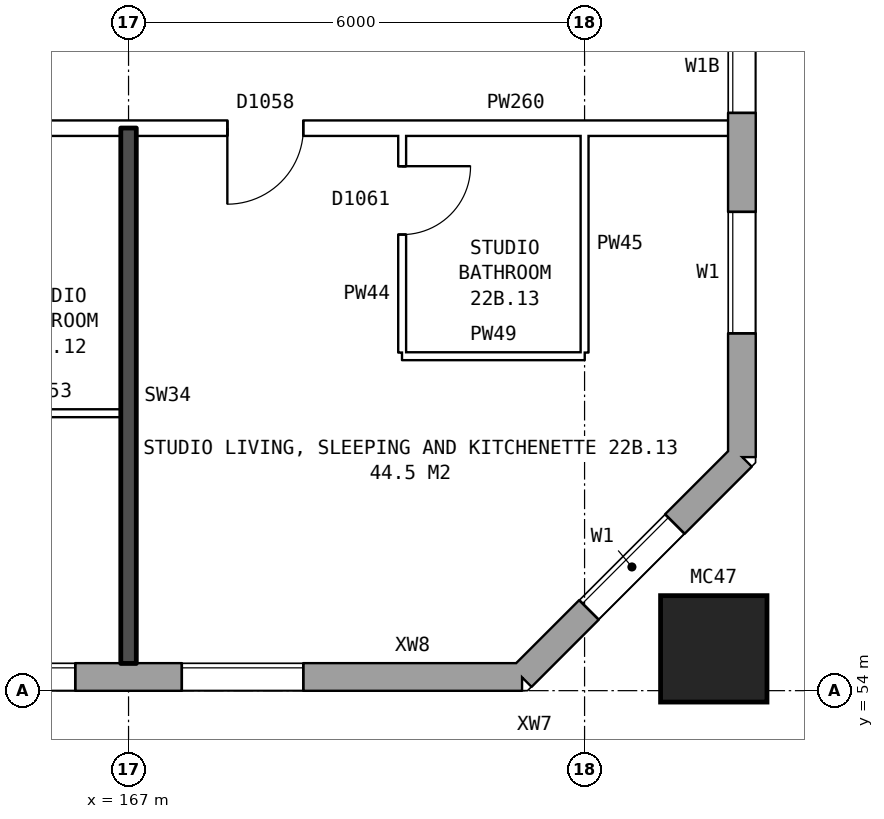
"""IFC4 building model, lengths in metres.
Left out: names, types, materials, properties, quantities, classifications, styles, units other than length and angle.
Written with IfcOpenShell. Run it as: python <this file> out.ifc"""

import sys

from ifc_helpers import new_model, si_unit, direction, frame, frame_2d, origin, origin_2d, place, context, subcontext, project, spatial, rectangle, hollow_rectangle, extrude, element, fill, save


model = new_model("IFC4")
c1 = context("Model", 3, precision=1e-05, world=origin(), true_north=direction((0.0, 1.0)))
c2 = subcontext(c1, "Body", "Model", "MODEL_VIEW")
j1 = project(units=[si_unit("LENGTHUNIT", "METRE"), si_unit("PLANEANGLEUNIT", "RADIAN")], contexts=[c1])
p1 = place(None, origin())
s1 = spatial("IfcSite", under=j1, at=p1, CompositionType="ELEMENT")
p2 = place(p1, origin())
s2 = spatial("IfcBuilding", under=s1, at=p2, CompositionType="ELEMENT")
p3 = place(p2, frame((0.0, 0.0, 80.9)))
s3 = spatial("IfcBuildingStorey", under=s2, at=p3, CompositionType="ELEMENT", Elevation=80.9)
p4 = place(p3, frame((174.7, 54.55, 0.0), z_axis=(0.0, 0.0, 1.0), x_axis=(1.0, 0.0, 0.0)))
e1 = element("IfcColumn", 1, at=p4, inside=s3, PredefinedType="COLUMN", context=c2, shape_type="SweptSolid", body=[
    extrude(hollow_rectangle(XDim=1.4, YDim=1.4, WallThickness=0.075, at=origin_2d()), origin(), (0.0, 0.0, 1.0), 3.1),
])
p5 = place(p3, frame((134.075, 54.18, 0.0), z_axis=(0.0, 0.0, 1.0), x_axis=(1.0, 0.0, 0.0)))
e2 = element("IfcWall", 2, at=p5, inside=s3, PredefinedType="STANDARD", context=c2, shape_type="SweptSolid", body=[
    extrude(rectangle(XDim=38.101, YDim=0.36, at=frame_2d((19.05, 0.0))), origin(), (0.0, 0.0, 1.0), 2.85),
])
p6 = place(p5, frame((0.625, 0.0, 0.8)))
e3 = element("IfcOpeningElement", 3, at=p6, cuts=e2, PredefinedType="OPENING", context=c2, shape_type="SweptSolid", body=[
    extrude(rectangle(XDim=1.6, YDim=1.8, at=frame_2d((0.8, 0.9))), frame((0.0, 0.19, 0.0), z_axis=(0.0, -1.0, 0.0), x_axis=(1.0, 0.0, 0.0)), (0.0, 0.0, 1.0), 0.38),
])
p7 = place(p5, frame((3.625, 0.0, 0.8)))
e4 = element("IfcOpeningElement", 4, at=p7, cuts=e2, PredefinedType="OPENING", context=c2, shape_type="SweptSolid", body=[
    extrude(rectangle(XDim=1.6, YDim=1.8, at=frame_2d((0.8, 0.9))), frame((0.0, 0.19, 0.0), z_axis=(0.0, -1.0, 0.0), x_axis=(1.0, 0.0, 0.0)), (0.0, 0.0, 1.0), 0.38),
])
p8 = place(p5, frame((6.625, 0.0, 0.8)))
e5 = element("IfcOpeningElement", 5, at=p8, cuts=e2, PredefinedType="OPENING", context=c2, shape_type="SweptSolid", body=[
    extrude(rectangle(XDim=1.6, YDim=1.8, at=frame_2d((0.8, 0.9))), frame((0.0, 0.19, 0.0), z_axis=(0.0, -1.0, 0.0), x_axis=(1.0, 0.0, 0.0)), (0.0, 0.0, 1.0), 0.38),
])
p9 = place(p5, frame((9.125, 0.0, 0.8)))
e6 = element("IfcOpeningElement", 6, at=p9, cuts=e2, PredefinedType="OPENING", context=c2, shape_type="SweptSolid", body=[
    extrude(rectangle(XDim=1.4, YDim=1.8, at=frame_2d((0.7, 0.9))), frame((0.0, 0.19, 0.0), z_axis=(0.0, -1.0, 0.0), x_axis=(1.0, 0.0, 0.0)), (0.0, 0.0, 1.0), 0.38),
])
p10 = place(p5, frame((12.575, 0.0, 0.8)))
e7 = element("IfcOpeningElement", 7, at=p10, cuts=e2, PredefinedType="OPENING", context=c2, shape_type="SweptSolid", body=[
    extrude(rectangle(XDim=0.6, YDim=0.9, at=frame_2d((0.3, 0.45))), frame((0.0, 0.19, 0.0), z_axis=(0.0, -1.0, 0.0), x_axis=(1.0, 0.0, 0.0)), (0.0, 0.0, 1.0), 0.38),
])
p11 = place(p5, frame((15.625, 0.0, 0.8)))
e8 = element("IfcOpeningElement", 8, at=p11, cuts=e2, PredefinedType="OPENING", context=c2, shape_type="SweptSolid", body=[
    extrude(rectangle(XDim=1.6, YDim=1.8, at=frame_2d((0.8, 0.9))), frame((0.0, 0.19, 0.0), z_axis=(0.0, -1.0, 0.0), x_axis=(1.0, 0.0, 0.0)), (0.0, 0.0, 1.0), 0.38),
])
p12 = place(p5, frame((18.625, 0.0, 0.8)))
e9 = element("IfcOpeningElement", 9, at=p12, cuts=e2, PredefinedType="OPENING", context=c2, shape_type="SweptSolid", body=[
    extrude(rectangle(XDim=1.6, YDim=1.8, at=frame_2d((0.8, 0.9))), frame((0.0, 0.19, 0.0), z_axis=(0.0, -1.0, 0.0), x_axis=(1.0, 0.0, 0.0)), (0.0, 0.0, 1.0), 0.38),
])
p13 = place(p5, frame((21.625, 0.0, 0.8)))
e10 = element("IfcOpeningElement", 10, at=p13, cuts=e2, PredefinedType="OPENING", context=c2, shape_type="SweptSolid", body=[
    extrude(rectangle(XDim=1.6, YDim=1.8, at=frame_2d((0.8, 0.9))), frame((0.0, 0.19, 0.0), z_axis=(0.0, -1.0, 0.0), x_axis=(1.0, 0.0, 0.0)), (0.0, 0.0, 1.0), 0.38),
])
p14 = place(p5, frame((23.525, 0.0, 0.8)))
e11 = element("IfcOpeningElement", 11, at=p14, cuts=e2, PredefinedType="OPENING", context=c2, shape_type="SweptSolid", body=[
    extrude(rectangle(XDim=1.0, YDim=1.8, at=frame_2d((0.5, 0.9))), frame((0.0, 0.19, 0.0), z_axis=(0.0, -1.0, 0.0), x_axis=(1.0, 0.0, 0.0)), (0.0, 0.0, 1.0), 0.38),
])
p15 = place(p5, frame((27.625, 0.0, 0.8)))
e12 = element("IfcOpeningElement", 12, at=p15, cuts=e2, PredefinedType="OPENING", context=c2, shape_type="SweptSolid", body=[
    extrude(rectangle(XDim=1.6, YDim=1.8, at=frame_2d((0.8, 0.9))), frame((0.0, 0.19, 0.0), z_axis=(0.0, -1.0, 0.0), x_axis=(1.0, 0.0, 0.0)), (0.0, 0.0, 1.0), 0.38),
])
p16 = place(p5, frame((30.625, 0.0, 0.8)))
e13 = element("IfcOpeningElement", 13, at=p16, cuts=e2, PredefinedType="OPENING", context=c2, shape_type="SweptSolid", body=[
    extrude(rectangle(XDim=1.6, YDim=1.8, at=frame_2d((0.8, 0.9))), frame((0.0, 0.19, 0.0), z_axis=(0.0, -1.0, 0.0), x_axis=(1.0, 0.0, 0.0)), (0.0, 0.0, 1.0), 0.38),
])
p17 = place(p5, frame((33.625, 0.0, 0.8)))
e14 = element("IfcOpeningElement", 14, at=p17, cuts=e2, PredefinedType="OPENING", context=c2, shape_type="SweptSolid", body=[
    extrude(rectangle(XDim=1.6, YDim=1.8, at=frame_2d((0.8, 0.9))), frame((0.0, 0.19, 0.0), z_axis=(0.0, -1.0, 0.0), x_axis=(1.0, 0.0, 0.0)), (0.0, 0.0, 1.0), 0.38),
])
p18 = place(p5, frame((10.825, 0.0, 1.7)))
e15 = element("IfcOpeningElement", 15, at=p18, cuts=e2, PredefinedType="OPENING", context=c2, shape_type="SweptSolid", body=[
    extrude(rectangle(XDim=0.6, YDim=0.9, at=frame_2d((0.3, 0.45))), frame((0.0, 0.19, 0.0), z_axis=(0.0, -1.0, 0.0), x_axis=(1.0, 0.0, 0.0)), (0.0, 0.0, 1.0), 0.38),
])
p19 = place(p5, frame((13.475, 0.0, 0.8)))
e16 = element("IfcOpeningElement", 16, at=p19, cuts=e2, PredefinedType="OPENING", context=c2, shape_type="SweptSolid", body=[
    extrude(rectangle(XDim=1.2, YDim=1.8, at=frame_2d((0.6, 0.9))), frame((0.0, 0.19, 0.0), z_axis=(0.0, -1.0, 0.0), x_axis=(1.0, 0.0, 0.0)), (0.0, 0.0, 1.0), 0.38),
])
p20 = place(p5, frame((24.825, 0.0, 0.8)))
e17 = element("IfcOpeningElement", 17, at=p20, cuts=e2, PredefinedType="OPENING", context=c2, shape_type="SweptSolid", body=[
    extrude(rectangle(XDim=0.6, YDim=0.9, at=frame_2d((0.3, 0.45))), frame((0.0, 0.19, 0.0), z_axis=(0.0, -1.0, 0.0), x_axis=(1.0, 0.0, 0.0)), (0.0, 0.0, 1.0), 0.38),
])
p21 = place(p3, frame((172.175, 54.18, 0.0), z_axis=(0.0, 0.0, 1.0), x_axis=(0.707106781187, 0.707106781187, 0.0)))
e18 = element("IfcWall", 18, at=p21, inside=s3, PredefinedType="STANDARD", context=c2, shape_type="SweptSolid", body=[
    extrude(rectangle(XDim=4.094, YDim=0.36, at=frame_2d((2.047, 0.0))), origin(), (0.0, 0.0, 1.0), 2.85),
])
p22 = place(p21, frame((1.247, 0.0, 0.8)))
e19 = element("IfcOpeningElement", 19, at=p22, cuts=e18, PredefinedType="OPENING", context=c2, shape_type="SweptSolid", body=[
    extrude(rectangle(XDim=1.6, YDim=1.8, at=frame_2d((0.8, 0.9))), frame((0.0, 0.19, 0.0), z_axis=(0.0, -1.0, 0.0), x_axis=(1.0, 0.0, 0.0)), (0.0, 0.0, 1.0), 0.38),
])
p23 = place(p3, frame((175.07, 57.075, 0.0), z_axis=(0.0, 0.0, 1.0), x_axis=(0.0, 1.0, 0.0)))
e20 = element("IfcWall", 20, at=p23, inside=s3, PredefinedType="STANDARD", context=c2, shape_type="SweptSolid", body=[
    extrude(rectangle(XDim=25.851, YDim=0.36, at=frame_2d((12.925, 0.0))), origin(), (0.0, 0.0, 1.0), 2.85),
])
p24 = place(p23, frame((1.625, 0.0, 0.8)))
e21 = element("IfcOpeningElement", 21, at=p24, cuts=e20, PredefinedType="OPENING", context=c2, shape_type="SweptSolid", body=[
    extrude(rectangle(XDim=1.6, YDim=1.8, at=frame_2d((0.8, 0.9))), frame((0.0, 0.19, 0.0), z_axis=(0.0, -1.0, 0.0), x_axis=(1.0, 0.0, 0.0)), (0.0, 0.0, 1.0), 0.38),
])
p25 = place(p23, frame((4.525, 0.0, 0.8)))
e22 = element("IfcOpeningElement", 22, at=p25, cuts=e20, PredefinedType="OPENING", context=c2, shape_type="SweptSolid", body=[
    extrude(rectangle(XDim=1.2, YDim=1.8, at=frame_2d((0.6, 0.9))), frame((0.0, 0.19, 0.0), z_axis=(0.0, -1.0, 0.0), x_axis=(1.0, 0.0, 0.0)), (0.0, 0.0, 1.0), 0.38),
])
p26 = place(p23, frame((6.025, 0.0, 0.8)))
e23 = element("IfcOpeningElement", 23, at=p26, cuts=e20, PredefinedType="OPENING", context=c2, shape_type="SweptSolid", body=[
    extrude(rectangle(XDim=1.0, YDim=0.9, at=frame_2d((0.5, 0.45))), frame((0.0, 0.19, 0.0), z_axis=(0.0, -1.0, 0.0), x_axis=(1.0, 0.0, 0.0)), (0.0, 0.0, 1.0), 0.38),
])
p27 = place(p23, frame((10.625, 0.0, 0.8)))
e24 = element("IfcOpeningElement", 24, at=p27, cuts=e20, PredefinedType="OPENING", context=c2, shape_type="SweptSolid", body=[
    extrude(rectangle(XDim=1.6, YDim=1.8, at=frame_2d((0.8, 0.9))), frame((0.0, 0.19, 0.0), z_axis=(0.0, -1.0, 0.0), x_axis=(1.0, 0.0, 0.0)), (0.0, 0.0, 1.0), 0.38),
])
p28 = place(p23, frame((13.625, 0.0, 0.8)))
e25 = element("IfcOpeningElement", 25, at=p28, cuts=e20, PredefinedType="OPENING", context=c2, shape_type="SweptSolid", body=[
    extrude(rectangle(XDim=1.6, YDim=1.8, at=frame_2d((0.8, 0.9))), frame((0.0, 0.19, 0.0), z_axis=(0.0, -1.0, 0.0), x_axis=(1.0, 0.0, 0.0)), (0.0, 0.0, 1.0), 0.38),
])
p29 = place(p23, frame((8.075, 0.0, 1.7)))
e26 = element("IfcOpeningElement", 26, at=p29, cuts=e20, PredefinedType="OPENING", context=c2, shape_type="SweptSolid", body=[
    extrude(rectangle(XDim=0.8, YDim=0.9, at=frame_2d((0.4, 0.45))), frame((0.0, 0.19, 0.0), z_axis=(0.0, -1.0, 0.0), x_axis=(1.0, 0.0, 0.0)), (0.0, 0.0, 1.0), 0.38),
])
p30 = place(p23, frame((9.325, 0.0, 0.8)))
e27 = element("IfcOpeningElement", 27, at=p30, cuts=e20, PredefinedType="OPENING", context=c2, shape_type="SweptSolid", body=[
    extrude(rectangle(XDim=1.0, YDim=1.8, at=frame_2d((0.5, 0.9))), frame((0.0, 0.19, 0.0), z_axis=(0.0, -1.0, 0.0), x_axis=(1.0, 0.0, 0.0)), (0.0, 0.0, 1.0), 0.38),
])
p31 = place(p23, frame((22.625, 0.0, 0.8)))
e28 = element("IfcOpeningElement", 28, at=p31, cuts=e20, PredefinedType="OPENING", context=c2, shape_type="SweptSolid", body=[
    extrude(rectangle(XDim=1.6, YDim=1.8, at=frame_2d((0.8, 0.9))), frame((0.0, 0.19, 0.0), z_axis=(0.0, -1.0, 0.0), x_axis=(1.0, 0.0, 0.0)), (0.0, 0.0, 1.0), 0.38),
])
p32 = place(p23, frame((12.525, 0.0, 0.8)))
e29 = element("IfcOpeningElement", 29, at=p32, cuts=e20, PredefinedType="OPENING", context=c2, shape_type="SweptSolid", body=[
    extrude(rectangle(XDim=0.8, YDim=1.8, at=frame_2d((0.4, 0.9))), frame((0.0, 0.19, 0.0), z_axis=(0.0, -1.0, 0.0), x_axis=(1.0, 0.0, 0.0)), (0.0, 0.0, 1.0), 0.38),
])
p33 = place(p23, frame((15.525, 0.0, 0.8)))
e30 = element("IfcOpeningElement", 30, at=p33, cuts=e20, PredefinedType="OPENING", context=c2, shape_type="SweptSolid", body=[
    extrude(rectangle(XDim=1.0, YDim=1.8, at=frame_2d((0.5, 0.9))), frame((0.0, 0.19, 0.0), z_axis=(0.0, -1.0, 0.0), x_axis=(1.0, 0.0, 0.0)), (0.0, 0.0, 1.0), 0.38),
])
p34 = place(p23, frame((16.825, 0.0, 1.6)))
e31 = element("IfcOpeningElement", 31, at=p34, cuts=e20, PredefinedType="OPENING", context=c2, shape_type="SweptSolid", body=[
    extrude(rectangle(XDim=0.8, YDim=0.9, at=frame_2d((0.4, 0.45))), frame((0.0, 0.19, 0.0), z_axis=(0.0, -1.0, 0.0), x_axis=(1.0, 0.0, 0.0)), (0.0, 0.0, 1.0), 0.38),
])
p35 = place(p23, frame((18.825, 0.0, 0.8)))
e32 = element("IfcOpeningElement", 32, at=p35, cuts=e20, PredefinedType="OPENING", context=c2, shape_type="SweptSolid", body=[
    extrude(rectangle(XDim=1.0, YDim=0.9, at=frame_2d((0.5, 0.45))), frame((0.0, 0.19, 0.0), z_axis=(0.0, -1.0, 0.0), x_axis=(1.0, 0.0, 0.0)), (0.0, 0.0, 1.0), 0.38),
])
p36 = place(p23, frame((20.125, 0.0, 0.8)))
e33 = element("IfcOpeningElement", 33, at=p36, cuts=e20, PredefinedType="OPENING", context=c2, shape_type="SweptSolid", body=[
    extrude(rectangle(XDim=1.2, YDim=1.8, at=frame_2d((0.6, 0.9))), frame((0.0, 0.19, 0.0), z_axis=(0.0, -1.0, 0.0), x_axis=(1.0, 0.0, 0.0)), (0.0, 0.0, 1.0), 0.38),
])
p37 = place(p3, frame((165.0, 57.65, 0.0), z_axis=(0.0, 0.0, 1.0), x_axis=(1.0, 0.0, 0.0)))
e34 = element("IfcWall", 34, at=p37, inside=s3, PredefinedType="PARTITIONING", context=c2, shape_type="SweptSolid", body=[
    extrude(rectangle(XDim=1.9, YDim=0.1, at=frame_2d((0.95, 0.0))), origin(), (0.0, 0.0, 1.0), 2.85),
])
p38 = place(p3, frame((170.6, 58.4, 0.0), z_axis=(0.0, 0.0, 1.0), x_axis=(1.0, 0.0, 0.0)))
e35 = element("IfcWall", 35, at=p38, inside=s3, PredefinedType="PARTITIONING", context=c2, shape_type="SweptSolid", body=[
    extrude(rectangle(XDim=2.4, YDim=0.1, at=frame_2d((1.2, 0.0))), origin(), (0.0, 0.0, 1.0), 2.85),
])
p39 = place(p3, frame((155.1, 61.4, 0.0), z_axis=(0.0, 0.0, 1.0), x_axis=(1.0, 0.0, 0.0)))
e36 = element("IfcWall", 36, at=p39, inside=s3, PredefinedType="PARTITIONING", context=c2, shape_type="SweptSolid", body=[
    extrude(rectangle(XDim=19.79, YDim=0.2, at=frame_2d((9.895, 0.0))), origin(), (0.0, 0.0, 1.0), 2.85),
])
p40 = place(p39, frame((1.45, 0.0, 0.0)))
e37 = element("IfcOpeningElement", 37, at=p40, cuts=e36, PredefinedType="OPENING", context=c2, shape_type="SweptSolid", body=[
    extrude(rectangle(XDim=1.0, YDim=2.1, at=frame_2d((0.5, 1.05))), frame((0.0, 0.11, 0.0), z_axis=(0.0, -1.0, 0.0), x_axis=(1.0, 0.0, 0.0)), (0.0, 0.0, 1.0), 0.22),
])
p41 = place(p39, frame((7.4, 0.0, 0.0)))
e38 = element("IfcOpeningElement", 38, at=p41, cuts=e36, PredefinedType="OPENING", context=c2, shape_type="SweptSolid", body=[
    extrude(rectangle(XDim=1.0, YDim=2.1, at=frame_2d((0.5, 1.05))), frame((0.0, 0.11, 0.0), z_axis=(0.0, -1.0, 0.0), x_axis=(1.0, 0.0, 0.0)), (0.0, 0.0, 1.0), 0.22),
])
p42 = place(p39, frame((13.2, 0.0, 0.0)))
e39 = element("IfcOpeningElement", 39, at=p42, cuts=e36, PredefinedType="OPENING", context=c2, shape_type="SweptSolid", body=[
    extrude(rectangle(XDim=1.0, YDim=2.1, at=frame_2d((0.5, 1.05))), frame((0.0, 0.11, 0.0), z_axis=(0.0, -1.0, 0.0), x_axis=(1.0, 0.0, 0.0)), (0.0, 0.0, 1.0), 0.22),
])
p43 = place(p3, frame((167.0, 54.36, 0.0), z_axis=(0.0, 0.0, 1.0), x_axis=(0.0, 1.0, 0.0)))
e40 = element("IfcWall", 40, at=p43, inside=s3, PredefinedType="SOLIDWALL", context=c2, shape_type="SweptSolid", body=[
    extrude(rectangle(XDim=7.04, YDim=0.2, at=frame_2d((3.52, 0.0))), origin(), (0.0, 0.0, 1.0), 2.85),
])
p44 = place(p3, frame((170.6, 58.45, 0.0), z_axis=(0.0, 0.0, 1.0), x_axis=(0.0, 1.0, 0.0)))
e41 = element("IfcWall", 41, at=p44, inside=s3, PredefinedType="PARTITIONING", context=c2, shape_type="SweptSolid", body=[
    extrude(rectangle(XDim=2.85, YDim=0.1, at=frame_2d((1.425, 0.0))), origin(), (0.0, 0.0, 1.0), 2.85),
])
p45 = place(p44, frame((1.55, 0.0, 0.0)))
e42 = element("IfcOpeningElement", 42, at=p45, cuts=e41, PredefinedType="OPENING", context=c2, shape_type="SweptSolid", body=[
    extrude(rectangle(XDim=0.9, YDim=2.1, at=frame_2d((0.45, 1.05))), frame((0.0, 0.06, 0.0), z_axis=(0.0, -1.0, 0.0), x_axis=(1.0, 0.0, 0.0)), (0.0, 0.0, 1.0), 0.12),
])
p46 = place(p3, frame((173.0, 58.45, 0.0), z_axis=(0.0, 0.0, 1.0), x_axis=(0.0, 1.0, 0.0)))
e43 = element("IfcWall", 43, at=p46, inside=s3, PredefinedType="PARTITIONING", context=c2, shape_type="SweptSolid", body=[
    extrude(rectangle(XDim=2.85, YDim=0.1, at=frame_2d((1.425, 0.0))), origin(), (0.0, 0.0, 1.0), 2.85),
])
p47 = place(p16, origin())
e44 = element("IfcWindow", 44, at=p47, inside=s3, PartitioningType="SINGLE_PANEL", PredefinedType="WINDOW", context=c2, shape_type="SweptSolid", body=[
    extrude(rectangle(XDim=1.6, YDim=1.8, at=frame_2d((0.8, 0.9))), frame((0.0, 0.15, 0.0), z_axis=(0.0, -1.0, 0.0), x_axis=(1.0, 0.0, 0.0)), (0.0, 0.0, 1.0), 0.06),
])
fill(e13, e44)
p48 = place(p17, origin())
e45 = element("IfcWindow", 45, at=p48, inside=s3, PartitioningType="SINGLE_PANEL", PredefinedType="WINDOW", context=c2, shape_type="SweptSolid", body=[
    extrude(rectangle(XDim=1.6, YDim=1.8, at=frame_2d((0.8, 0.9))), frame((0.0, 0.15, 0.0), z_axis=(0.0, -1.0, 0.0), x_axis=(1.0, 0.0, 0.0)), (0.0, 0.0, 1.0), 0.06),
])
fill(e14, e45)
p49 = place(p22, origin())
e46 = element("IfcWindow", 46, at=p49, inside=s3, PartitioningType="SINGLE_PANEL", PredefinedType="WINDOW", context=c2, shape_type="SweptSolid", body=[
    extrude(rectangle(XDim=1.6, YDim=1.8, at=frame_2d((0.8, 0.9))), frame((0.0, 0.15, 0.0), z_axis=(0.0, -1.0, 0.0), x_axis=(1.0, 0.0, 0.0)), (0.0, 0.0, 1.0), 0.06),
])
fill(e19, e46)
p50 = place(p24, origin())
e47 = element("IfcWindow", 47, at=p50, inside=s3, PartitioningType="SINGLE_PANEL", PredefinedType="WINDOW", context=c2, shape_type="SweptSolid", body=[
    extrude(rectangle(XDim=1.6, YDim=1.8, at=frame_2d((0.8, 0.9))), frame((0.0, 0.15, 0.0), z_axis=(0.0, -1.0, 0.0), x_axis=(1.0, 0.0, 0.0)), (0.0, 0.0, 1.0), 0.06),
])
fill(e21, e47)
p51 = place(p25, origin())
e48 = element("IfcWindow", 48, at=p51, inside=s3, PartitioningType="SINGLE_PANEL", PredefinedType="WINDOW", context=c2, shape_type="SweptSolid", body=[
    extrude(rectangle(XDim=1.2, YDim=1.8, at=frame_2d((0.6, 0.9))), frame((0.0, 0.15, 0.0), z_axis=(0.0, -1.0, 0.0), x_axis=(1.0, 0.0, 0.0)), (0.0, 0.0, 1.0), 0.06),
])
fill(e22, e48)
p52 = place(p42, frame((1.0, 0.0, 0.0), z_axis=(0.0, 0.0, 1.0), x_axis=(-1.0, 0.0, 0.0)))
e49 = element("IfcDoor", 49, at=p52, inside=s3, OperationType="SINGLE_SWING_RIGHT", PredefinedType="DOOR", context=c2, shape_type="SweptSolid", body=[
    extrude(rectangle(XDim=1.0, YDim=2.1, at=frame_2d((0.5, 1.05))), frame((0.0, 0.025, 0.0), z_axis=(0.0, -1.0, 0.0), x_axis=(1.0, 0.0, 0.0)), (0.0, 0.0, 1.0), 0.05),
])
fill(e39, e49)
p53 = place(p45, frame((0.9, 0.0, 0.0), z_axis=(0.0, 0.0, 1.0), x_axis=(-1.0, 0.0, 0.0)))
e50 = element("IfcDoor", 50, at=p53, inside=s3, OperationType="SINGLE_SWING_LEFT", PredefinedType="DOOR", context=c2, shape_type="SweptSolid", body=[
    extrude(rectangle(XDim=0.9, YDim=2.1, at=frame_2d((0.45, 1.05))), frame((0.0, 0.025, 0.0), z_axis=(0.0, -1.0, 0.0), x_axis=(1.0, 0.0, 0.0)), (0.0, 0.0, 1.0), 0.05),
])
fill(e42, e50)
save(model, sys.argv[1])
